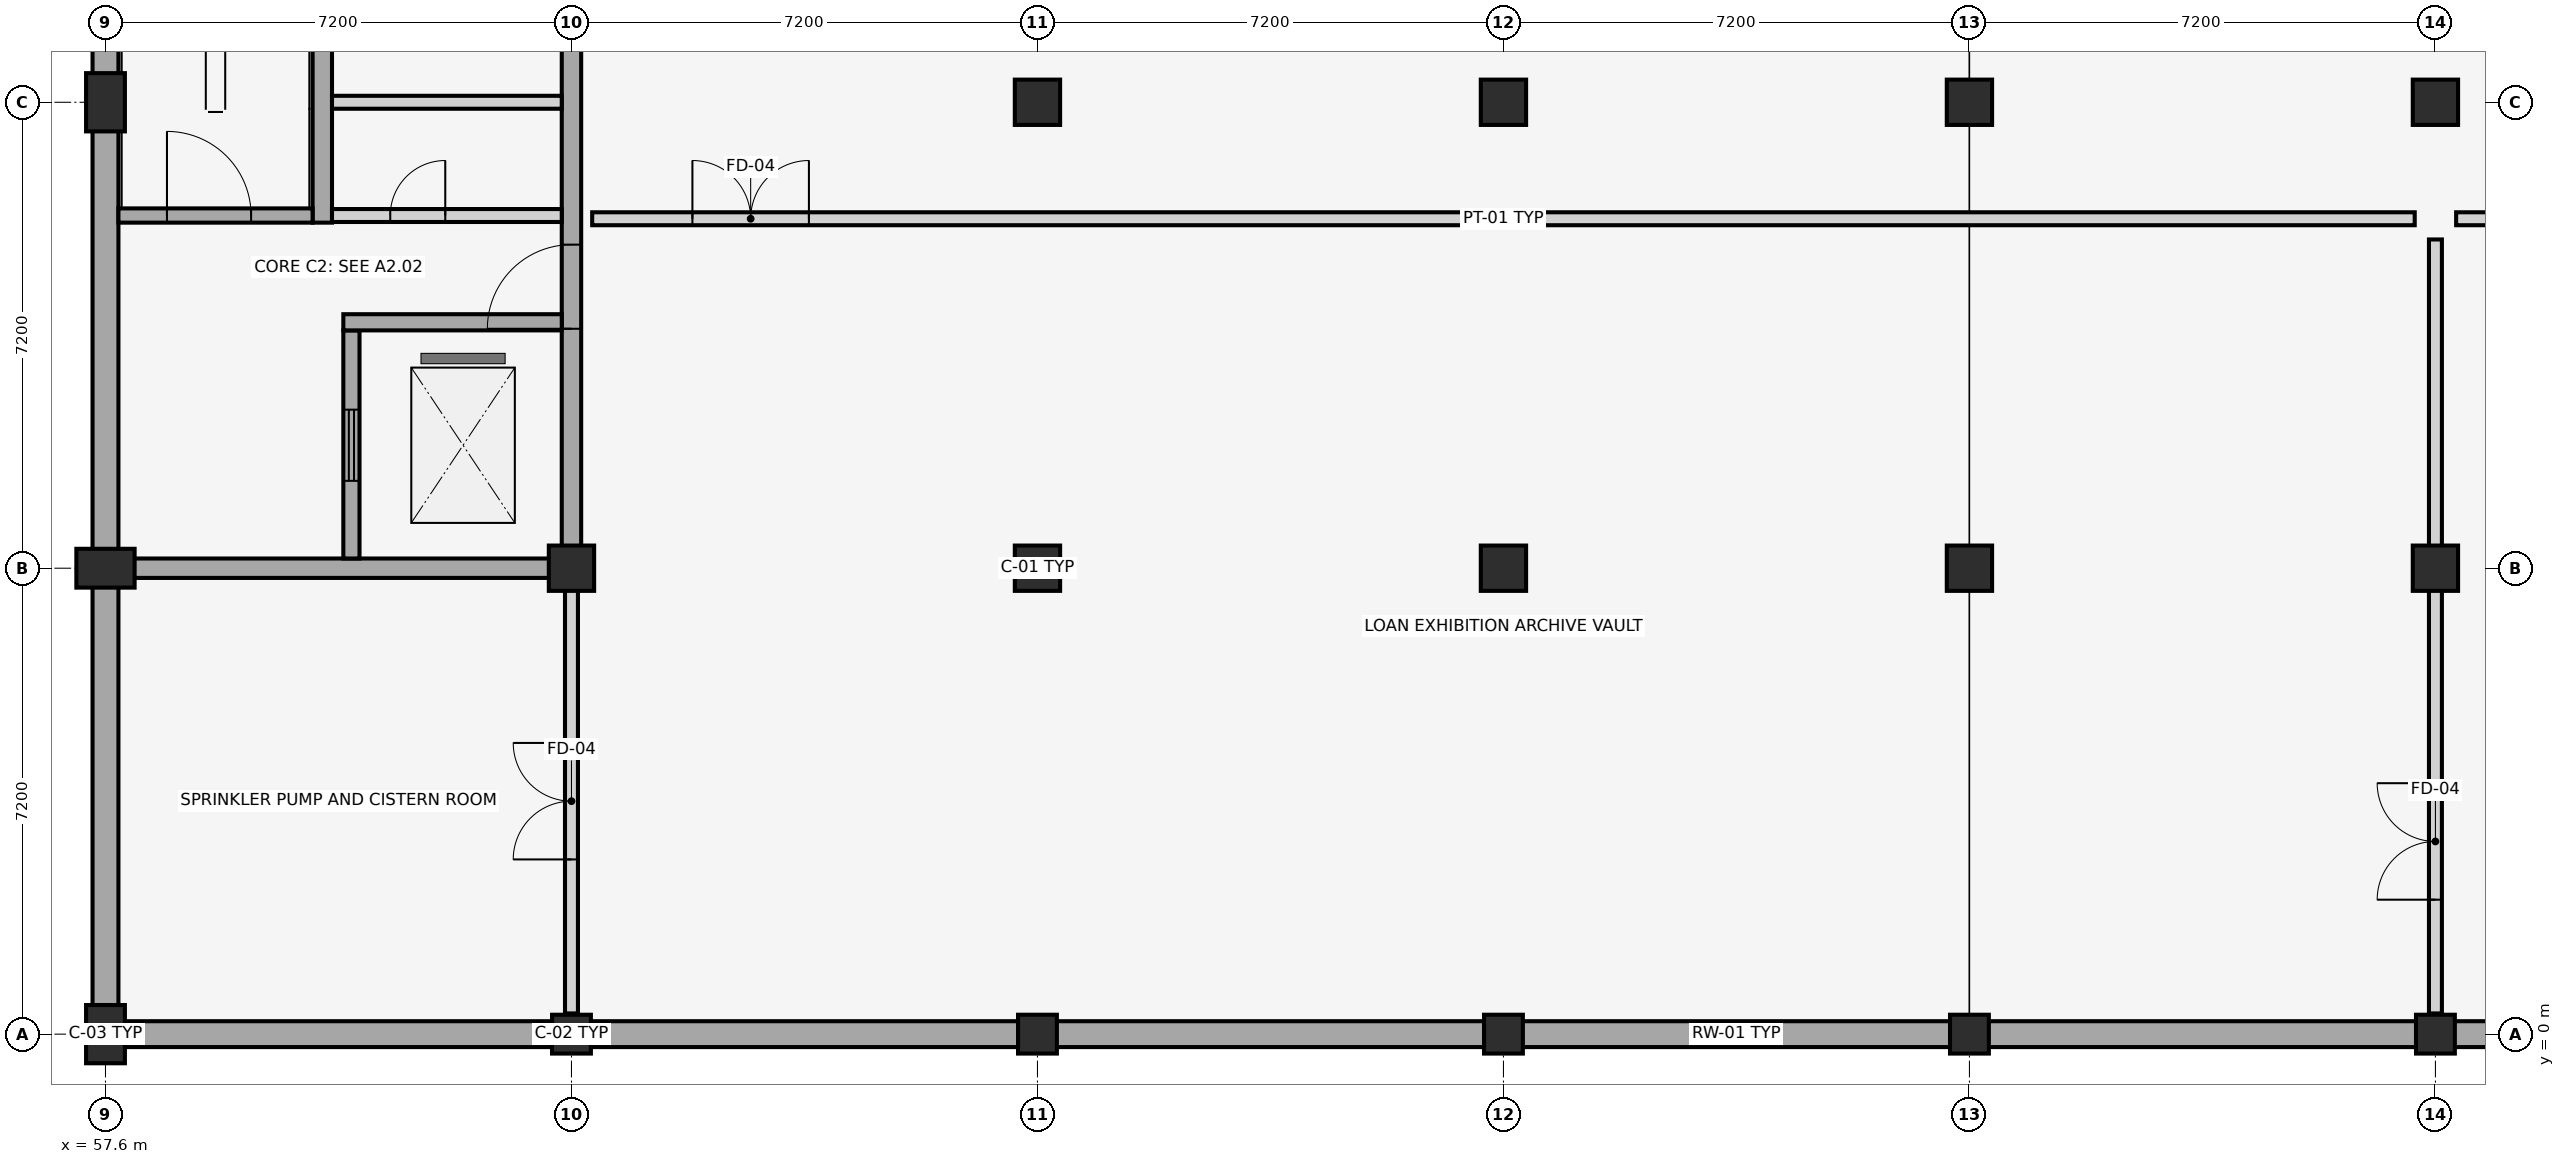
"""IFC4 building model, lengths in metres.
Left out: names, types, materials, properties, quantities, classifications, styles, units other than length and angle.
Written with IfcOpenShell. Run it as: python <this file> out.ifc"""

import sys

from ifc_helpers import new_model, si_unit, direction, frame, frame_2d, origin, origin_2d, place, context, subcontext, project, spatial, rectangle, extrude, element, fill, save


model = new_model("IFC4")
c1 = context("Model", 3, precision=1e-05, world=origin(), true_north=direction((0.0, 1.0)))
c2 = subcontext(c1, "Body", "Model", "MODEL_VIEW")
j1 = project(units=[si_unit("LENGTHUNIT", "METRE"), si_unit("PLANEANGLEUNIT", "RADIAN")], contexts=[c1])
p1 = place(None, origin())
s1 = spatial("IfcSite", under=j1, at=p1, CompositionType="ELEMENT")
p2 = place(p1, origin())
s2 = spatial("IfcBuilding", under=s1, at=p2, CompositionType="ELEMENT")
p3 = place(p2, frame((0.0, 0.0, -4.5)))
s3 = spatial("IfcBuildingStorey", under=s2, at=p3, CompositionType="ELEMENT", Elevation=-4.5)
p4 = place(p3, frame((57.4, 0.0, 0.0), z_axis=(0.0, 0.0, 1.0), x_axis=(1.0, 0.0, 0.0)))
e1 = element("IfcWall", 1, at=p4, inside=s3, PredefinedType="USERDEFINED", context=c2, shape_type="SweptSolid", body=[
    extrude(rectangle(XDim=50.8, YDim=0.4, at=frame_2d((25.4, 0.0))), origin(), (0.0, 0.0, 1.0), 3.67),
])
p5 = place(p3, frame((57.6, 28.6, 0.0), z_axis=(0.0, 0.0, 1.0), x_axis=(0.0, -1.0, 0.0)))
e2 = element("IfcWall", 2, at=p5, inside=s3, PredefinedType="USERDEFINED", context=c2, shape_type="SweptSolid", body=[
    extrude(rectangle(XDim=28.4, YDim=0.4, at=frame_2d((14.2, 0.0))), origin(), (0.0, 0.0, 1.0), 3.67),
])
for number, where, z_axis, x_axis in (
    (3, (57.6, 0.0, -0.45), (0.0, 0.0, 1.0), (1.0, 0.0, 0.0)),
    (4, (57.6, 7.2, -0.45), (0.0, 0.0, 1.0), (0.0, 1.0, 0.0)),
    (5, (57.6, 14.4, -0.45), (0.0, 0.0, 1.0), (1.0, 0.0, 0.0)),
):
    element("IfcColumn", number, at=place(p3, frame(where, z_axis=z_axis, x_axis=x_axis)), inside=s3, PredefinedType="PILASTER", context=c2, shape_type="SweptSolid", body=[
        extrude(rectangle(XDim=0.6, YDim=0.9, at=origin_2d()), origin(), (0.0, 0.0, 1.0), 4.95),
    ])
p6 = place(p3, frame((64.8, 0.0, -0.45), z_axis=(0.0, 0.0, 1.0), x_axis=(0.0, 1.0, 0.0)))
e6 = element("IfcColumn", 6, at=p6, inside=s3, PredefinedType="COLUMN", context=c2, shape_type="SweptSolid", body=[
    extrude(rectangle(XDim=0.6, YDim=0.6, at=origin_2d()), origin(), (0.0, 0.0, 1.0), 4.95),
])
p7 = place(p3, frame((64.8, 7.2, -0.45), z_axis=(0.0, 0.0, 1.0), x_axis=(1.0, 0.0, 0.0)))
e7 = element("IfcColumn", 7, at=p7, inside=s3, PredefinedType="COLUMN", context=c2, shape_type="SweptSolid", body=[
    extrude(rectangle(XDim=0.7, YDim=0.7, at=origin_2d()), origin(), (0.0, 0.0, 1.0), 4.95),
])
p8 = place(p3, frame((72.0, 0.0, -0.45), z_axis=(0.0, 0.0, 1.0), x_axis=(1.0, 0.0, 0.0)))
e8 = element("IfcColumn", 8, at=p8, inside=s3, PredefinedType="COLUMN", context=c2, shape_type="SweptSolid", body=[
    extrude(rectangle(XDim=0.6, YDim=0.6, at=origin_2d()), origin(), (0.0, 0.0, 1.0), 4.95),
])
for number, where, z_axis, x_axis in (
    (9, (72.0, 7.2, -0.45), (0.0, 0.0, 1.0), (0.0, 1.0, 0.0)),
    (10, (72.0, 14.4, -0.45), (0.0, 0.0, 1.0), (1.0, 0.0, 0.0)),
):
    element("IfcColumn", number, at=place(p3, frame(where, z_axis=z_axis, x_axis=x_axis)), inside=s3, PredefinedType="COLUMN", context=c2, shape_type="SweptSolid", body=[
        extrude(rectangle(XDim=0.7, YDim=0.7, at=origin_2d()), origin(), (0.0, 0.0, 1.0), 4.95),
    ])
p9 = place(p3, frame((79.2, 0.0, -0.45), z_axis=(0.0, 0.0, 1.0), x_axis=(0.0, 1.0, 0.0)))
e11 = element("IfcColumn", 11, at=p9, inside=s3, PredefinedType="COLUMN", context=c2, shape_type="SweptSolid", body=[
    extrude(rectangle(XDim=0.6, YDim=0.6, at=origin_2d()), origin(), (0.0, 0.0, 1.0), 4.95),
])
for number, where, z_axis, x_axis in (
    (12, (79.2, 7.2, -0.45), (0.0, 0.0, 1.0), (1.0, 0.0, 0.0)),
    (13, (79.2, 14.4, -0.45), (0.0, 0.0, 1.0), (0.0, 1.0, 0.0)),
):
    element("IfcColumn", number, at=place(p3, frame(where, z_axis=z_axis, x_axis=x_axis)), inside=s3, PredefinedType="COLUMN", context=c2, shape_type="SweptSolid", body=[
        extrude(rectangle(XDim=0.7, YDim=0.7, at=origin_2d()), origin(), (0.0, 0.0, 1.0), 4.95),
    ])
p10 = place(p3, frame((86.4, 0.0, -0.45), z_axis=(0.0, 0.0, 1.0), x_axis=(1.0, 0.0, 0.0)))
e14 = element("IfcColumn", 14, at=p10, inside=s3, PredefinedType="COLUMN", context=c2, shape_type="SweptSolid", body=[
    extrude(rectangle(XDim=0.6, YDim=0.6, at=origin_2d()), origin(), (0.0, 0.0, 1.0), 4.95),
])
for number, where, z_axis, x_axis in (
    (15, (86.4, 7.2, -0.45), (0.0, 0.0, 1.0), (0.0, 1.0, 0.0)),
    (16, (86.4, 14.4, -0.45), (0.0, 0.0, 1.0), (1.0, 0.0, 0.0)),
):
    element("IfcColumn", number, at=place(p3, frame(where, z_axis=z_axis, x_axis=x_axis)), inside=s3, PredefinedType="COLUMN", context=c2, shape_type="SweptSolid", body=[
        extrude(rectangle(XDim=0.7, YDim=0.7, at=origin_2d()), origin(), (0.0, 0.0, 1.0), 4.95),
    ])
p11 = place(p3, frame((93.6, 0.0, -0.45), z_axis=(0.0, 0.0, 1.0), x_axis=(0.0, 1.0, 0.0)))
e17 = element("IfcColumn", 17, at=p11, inside=s3, PredefinedType="COLUMN", context=c2, shape_type="SweptSolid", body=[
    extrude(rectangle(XDim=0.6, YDim=0.6, at=origin_2d()), origin(), (0.0, 0.0, 1.0), 4.95),
])
for number, where, z_axis, x_axis in (
    (18, (93.6, 7.2, -0.45), (0.0, 0.0, 1.0), (1.0, 0.0, 0.0)),
    (19, (93.6, 14.4, -0.45), (0.0, 0.0, 1.0), (0.0, 1.0, 0.0)),
):
    element("IfcColumn", number, at=place(p3, frame(where, z_axis=z_axis, x_axis=x_axis)), inside=s3, PredefinedType="COLUMN", context=c2, shape_type="SweptSolid", body=[
        extrude(rectangle(XDim=0.7, YDim=0.7, at=origin_2d()), origin(), (0.0, 0.0, 1.0), 4.95),
    ])
p12 = place(p3, frame((57.8, 7.2, 0.0), z_axis=(0.0, 0.0, 1.0), x_axis=(1.0, 0.0, 0.0)))
e20 = element("IfcWall", 20, at=p12, inside=s3, PredefinedType="SHEAR", context=c2, shape_type="SweptSolid", body=[
    extrude(rectangle(XDim=7.15, YDim=0.3, at=frame_2d((3.575, 0.0))), origin(), (0.0, 0.0, 1.0), 4.25),
])
p13 = place(p3, frame((64.8, 7.35, 0.0), z_axis=(0.0, 0.0, 1.0), x_axis=(0.0, 1.0, 0.0)))
e21 = element("IfcWall", 21, at=p13, inside=s3, PredefinedType="SHEAR", context=c2, shape_type="SweptSolid", body=[
    extrude(rectangle(XDim=14.1, YDim=0.3, at=frame_2d((7.05, 0.0))), origin(), (0.0, 0.0, 1.0), 4.25),
])
p14 = place(p13, frame((3.55, 0.0, 0.0)))
e22 = element("IfcOpeningElement", 22, at=p14, cuts=e21, PredefinedType="OPENING", context=c2, shape_type="SweptSolid", body=[
    extrude(rectangle(XDim=1.3, YDim=2.2, at=frame_2d((0.65, 1.1))), frame((0.0, 0.16, 0.0), z_axis=(0.0, -1.0, 0.0), x_axis=(1.0, 0.0, 0.0)), (0.0, 0.0, 1.0), 0.32),
])
p15 = place(p13, frame((7.85, 0.0, 0.0)))
e23 = element("IfcOpeningElement", 23, at=p15, cuts=e21, PredefinedType="OPENING", context=c2, shape_type="SweptSolid", body=[
    extrude(rectangle(XDim=1.05, YDim=2.15, at=frame_2d((0.525, 1.075))), frame((0.0, 0.16, 0.0), z_axis=(0.0, -1.0, 0.0), x_axis=(1.0, 0.0, 0.0)), (0.0, 0.0, 1.0), 0.32),
])
p16 = place(p13, frame((10.55, 0.0, 0.0)))
e24 = element("IfcOpeningElement", 24, at=p16, cuts=e21, PredefinedType="OPENING", context=c2, shape_type="SweptSolid", body=[
    extrude(rectangle(XDim=1.0, YDim=2.15, at=frame_2d((0.5, 1.075))), frame((0.0, 0.16, 0.0), z_axis=(0.0, -1.0, 0.0), x_axis=(1.0, 0.0, 0.0)), (0.0, 0.0, 1.0), 0.32),
])
p17 = place(p3, frame((61.4, 7.35, 0.0), z_axis=(0.0, 0.0, 1.0), x_axis=(0.0, 1.0, 0.0)))
e25 = element("IfcWall", 25, at=p17, inside=s3, PredefinedType="SHEAR", context=c2, shape_type="SweptSolid", body=[
    extrude(rectangle(XDim=3.525, YDim=0.25, at=frame_2d((1.762, 0.0))), origin(), (0.0, 0.0, 1.0), 4.25),
])
p18 = place(p17, frame((1.2, 0.0, 0.0)))
e26 = element("IfcOpeningElement", 26, at=p18, cuts=e25, PredefinedType="OPENING", context=c2, shape_type="SweptSolid", body=[
    extrude(rectangle(XDim=1.1, YDim=2.15, at=frame_2d((0.55, 1.075))), frame((0.0, 0.135, 0.0), z_axis=(0.0, -1.0, 0.0), x_axis=(1.0, 0.0, 0.0)), (0.0, 0.0, 1.0), 0.27),
])
p19 = place(p3, frame((60.95, 12.54, 0.0), z_axis=(0.0, 0.0, 1.0), x_axis=(0.0, 1.0, 0.0)))
e27 = element("IfcWall", 27, at=p19, inside=s3, PredefinedType="SHEAR", context=c2, shape_type="SweptSolid", body=[
    extrude(rectangle(XDim=8.91, YDim=0.3, at=frame_2d((4.455, 0.0))), origin(), (0.0, 0.0, 1.0), 4.25),
])
p20 = place(p3, frame((61.1, 12.65, 0.0), z_axis=(0.0, 0.0, 1.0), x_axis=(1.0, 0.0, 0.0)))
e28 = element("IfcWall", 28, at=p20, inside=s3, PredefinedType="PLUMBINGWALL", context=c2, shape_type="SweptSolid", body=[
    extrude(rectangle(XDim=3.55, YDim=0.2, at=frame_2d((1.775, 0.0))), origin(), (0.0, 0.0, 1.0), 3.67),
])
p21 = place(p20, frame((0.9, 0.0, 0.0)))
e29 = element("IfcOpeningElement", 29, at=p21, cuts=e28, PredefinedType="OPENING", context=c2, shape_type="SweptSolid", body=[
    extrude(rectangle(XDim=0.85, YDim=2.05, at=frame_2d((0.425, 1.025))), frame((0.0, 0.11, 0.0), z_axis=(0.0, -1.0, 0.0), x_axis=(1.0, 0.0, 0.0)), (0.0, 0.0, 1.0), 0.22),
])
p22 = place(p3, frame((57.8, 12.65, 0.0), z_axis=(0.0, 0.0, 1.0), x_axis=(1.0, 0.0, 0.0)))
e30 = element("IfcWall", 30, at=p22, inside=s3, PredefinedType="SHEAR", context=c2, shape_type="SweptSolid", body=[
    extrude(rectangle(XDim=3.0, YDim=0.22, at=frame_2d((1.5, 0.0))), origin(), (0.0, 0.0, 1.0), 4.25),
])
p23 = place(p22, frame((0.75, 0.0, 0.0)))
e31 = element("IfcOpeningElement", 31, at=p23, cuts=e30, PredefinedType="OPENING", context=c2, shape_type="SweptSolid", body=[
    extrude(rectangle(XDim=1.3, YDim=2.2, at=frame_2d((0.65, 1.1))), frame((0.0, 0.12, 0.0), z_axis=(0.0, -1.0, 0.0), x_axis=(1.0, 0.0, 0.0)), (0.0, 0.0, 1.0), 0.24),
])
p24 = place(p3, frame((61.275, 11.0, 0.0), z_axis=(0.0, 0.0, 1.0), x_axis=(1.0, 0.0, 0.0)))
e32 = element("IfcWall", 32, at=p24, inside=s3, PredefinedType="SHEAR", context=c2, shape_type="SweptSolid", body=[
    extrude(rectangle(XDim=3.375, YDim=0.25, at=frame_2d((1.688, 0.0))), origin(), (0.0, 0.0, 1.0), 4.25),
])
p25 = place(p3, frame((61.1, 14.4, 0.0), z_axis=(0.0, 0.0, 1.0), x_axis=(1.0, 0.0, 0.0)))
e33 = element("IfcWall", 33, at=p25, inside=s3, PredefinedType="PLUMBINGWALL", context=c2, shape_type="SweptSolid", body=[
    extrude(rectangle(XDim=3.55, YDim=0.2, at=frame_2d((1.775, 0.0))), origin(), (0.0, 0.0, 1.0), 3.67),
])
p26 = place(p3, frame((65.12, 12.6, 0.0), z_axis=(0.0, 0.0, 1.0), x_axis=(1.0, 0.0, 0.0)))
e34 = element("IfcWall", 34, at=p26, inside=s3, PredefinedType="PARTITIONING", context=c2, shape_type="SweptSolid", body=[
    extrude(rectangle(XDim=28.16, YDim=0.2, at=frame_2d((14.08, 0.0))), origin(), (0.0, 0.0, 1.0), 3.45),
])
p27 = place(p26, frame((1.549, 0.0, 0.0)))
e35 = element("IfcOpeningElement", 35, at=p27, cuts=e34, PredefinedType="OPENING", context=c2, shape_type="SweptSolid", body=[
    extrude(rectangle(XDim=1.8, YDim=2.4, at=frame_2d((0.9, 1.2))), frame((0.0, 0.11, 0.0), z_axis=(0.0, -1.0, 0.0), x_axis=(1.0, 0.0, 0.0)), (0.0, 0.0, 1.0), 0.22),
])
p28 = place(p3, frame((93.92, 12.6, 0.0), z_axis=(0.0, 0.0, 1.0), x_axis=(1.0, 0.0, 0.0)))
e36 = element("IfcWall", 36, at=p28, inside=s3, PredefinedType="PARTITIONING", context=c2, shape_type="SweptSolid", body=[
    extrude(rectangle(XDim=6.56, YDim=0.2, at=frame_2d((3.28, 0.0))), origin(), (0.0, 0.0, 1.0), 3.45),
])
p29 = place(p28, frame((2.53, 0.0, 0.0)))
e37 = element("IfcOpeningElement", 37, at=p29, cuts=e36, PredefinedType="OPENING", context=c2, shape_type="SweptSolid", body=[
    extrude(rectangle(XDim=1.5, YDim=2.25, at=frame_2d((0.75, 1.125))), frame((0.0, 0.11, 0.0), z_axis=(0.0, -1.0, 0.0), x_axis=(1.0, 0.0, 0.0)), (0.0, 0.0, 1.0), 0.22),
])
p30 = place(p3, frame((93.6, 0.32, 0.0), z_axis=(0.0, 0.0, 1.0), x_axis=(0.0, 1.0, 0.0)))
e38 = element("IfcWall", 38, at=p30, inside=s3, PredefinedType="PARTITIONING", context=c2, shape_type="SweptSolid", body=[
    extrude(rectangle(XDim=11.96, YDim=0.2, at=frame_2d((5.98, 0.0))), origin(), (0.0, 0.0, 1.0), 3.45),
])
p31 = place(p30, frame((1.758, 0.0, 0.0)))
e39 = element("IfcOpeningElement", 39, at=p31, cuts=e38, PredefinedType="OPENING", context=c2, shape_type="SweptSolid", body=[
    extrude(rectangle(XDim=1.8, YDim=2.4, at=frame_2d((0.9, 1.2))), frame((0.0, 0.11, 0.0), z_axis=(0.0, -1.0, 0.0), x_axis=(1.0, 0.0, 0.0)), (0.0, 0.0, 1.0), 0.22),
])
p32 = place(p3, frame((64.8, 0.32, 0.0), z_axis=(0.0, 0.0, 1.0), x_axis=(0.0, 1.0, 0.0)))
e40 = element("IfcWall", 40, at=p32, inside=s3, PredefinedType="PARTITIONING", context=c2, shape_type="SweptSolid", body=[
    extrude(rectangle(XDim=6.56, YDim=0.2, at=frame_2d((3.28, 0.0))), origin(), (0.0, 0.0, 1.0), 3.45),
])
p33 = place(p32, frame((2.38, 0.0, 0.0)))
e41 = element("IfcOpeningElement", 41, at=p33, cuts=e40, PredefinedType="OPENING", context=c2, shape_type="SweptSolid", body=[
    extrude(rectangle(XDim=1.8, YDim=2.4, at=frame_2d((0.9, 1.2))), frame((0.0, 0.11, 0.0), z_axis=(0.0, -1.0, 0.0), x_axis=(1.0, 0.0, 0.0)), (0.0, 0.0, 1.0), 0.22),
])
p34 = place(p14, origin())
e42 = element("IfcDoor", 42, at=p34, inside=s3, OperationType="SINGLE_SWING_LEFT", PredefinedType="DOOR", context=c2, shape_type="SweptSolid", body=[
    extrude(rectangle(XDim=1.3, YDim=2.2, at=frame_2d((0.65, 1.1))), frame((0.0, 0.025, 0.0), z_axis=(0.0, -1.0, 0.0), x_axis=(1.0, 0.0, 0.0)), (0.0, 0.0, 1.0), 0.05),
])
fill(e22, e42)
p35 = place(p18, origin())
e43 = element("IfcDoor", 43, at=p35, inside=s3, OperationType="SLIDING_TO_LEFT", PredefinedType="DOOR", context=c2, shape_type="SweptSolid", body=[
    extrude(rectangle(XDim=1.1, YDim=2.15, at=frame_2d((0.55, 1.075))), frame((0.0, 0.025, 0.0), z_axis=(0.0, -1.0, 0.0), x_axis=(1.0, 0.0, 0.0)), (0.0, 0.0, 1.0), 0.05),
])
fill(e26, e43)
p36 = place(p21, origin())
e44 = element("IfcDoor", 44, at=p36, inside=s3, OperationType="SINGLE_SWING_RIGHT", PredefinedType="TRAPDOOR", context=c2, shape_type="SweptSolid", body=[
    extrude(rectangle(XDim=0.85, YDim=2.05, at=frame_2d((0.425, 1.025))), frame((0.0, 0.025, 0.0), z_axis=(0.0, -1.0, 0.0), x_axis=(1.0, 0.0, 0.0)), (0.0, 0.0, 1.0), 0.05),
])
fill(e29, e44)
p37 = place(p23, origin())
e45 = element("IfcDoor", 45, at=p37, inside=s3, OperationType="SINGLE_SWING_LEFT", PredefinedType="DOOR", context=c2, shape_type="SweptSolid", body=[
    extrude(rectangle(XDim=1.3, YDim=2.2, at=frame_2d((0.65, 1.1))), frame((0.0, 0.025, 0.0), z_axis=(0.0, -1.0, 0.0), x_axis=(1.0, 0.0, 0.0)), (0.0, 0.0, 1.0), 0.05),
])
fill(e31, e45)
p38 = place(p27, origin())
e46 = element("IfcDoor", 46, at=p38, inside=s3, OperationType="DOUBLE_DOOR_SINGLE_SWING", PredefinedType="DOOR", context=c2, shape_type="SweptSolid", body=[
    extrude(rectangle(XDim=1.8, YDim=2.4, at=frame_2d((0.9, 1.2))), frame((0.0, 0.025, 0.0), z_axis=(0.0, -1.0, 0.0), x_axis=(1.0, 0.0, 0.0)), (0.0, 0.0, 1.0), 0.05),
])
fill(e35, e46)
p39 = place(p31, origin())
e47 = element("IfcDoor", 47, at=p39, inside=s3, OperationType="DOUBLE_DOOR_SINGLE_SWING", PredefinedType="DOOR", context=c2, shape_type="SweptSolid", body=[
    extrude(rectangle(XDim=1.8, YDim=2.4, at=frame_2d((0.9, 1.2))), frame((0.0, 0.025, 0.0), z_axis=(0.0, -1.0, 0.0), x_axis=(1.0, 0.0, 0.0)), (0.0, 0.0, 1.0), 0.05),
])
fill(e39, e47)
p40 = place(p33, origin())
e48 = element("IfcDoor", 48, at=p40, inside=s3, OperationType="DOUBLE_DOOR_SINGLE_SWING", PredefinedType="DOOR", context=c2, shape_type="SweptSolid", body=[
    extrude(rectangle(XDim=1.8, YDim=2.4, at=frame_2d((0.9, 1.2))), frame((0.0, 0.025, 0.0), z_axis=(0.0, -1.0, 0.0), x_axis=(1.0, 0.0, 0.0)), (0.0, 0.0, 1.0), 0.05),
])
fill(e41, e48)
save(model, sys.argv[1])
